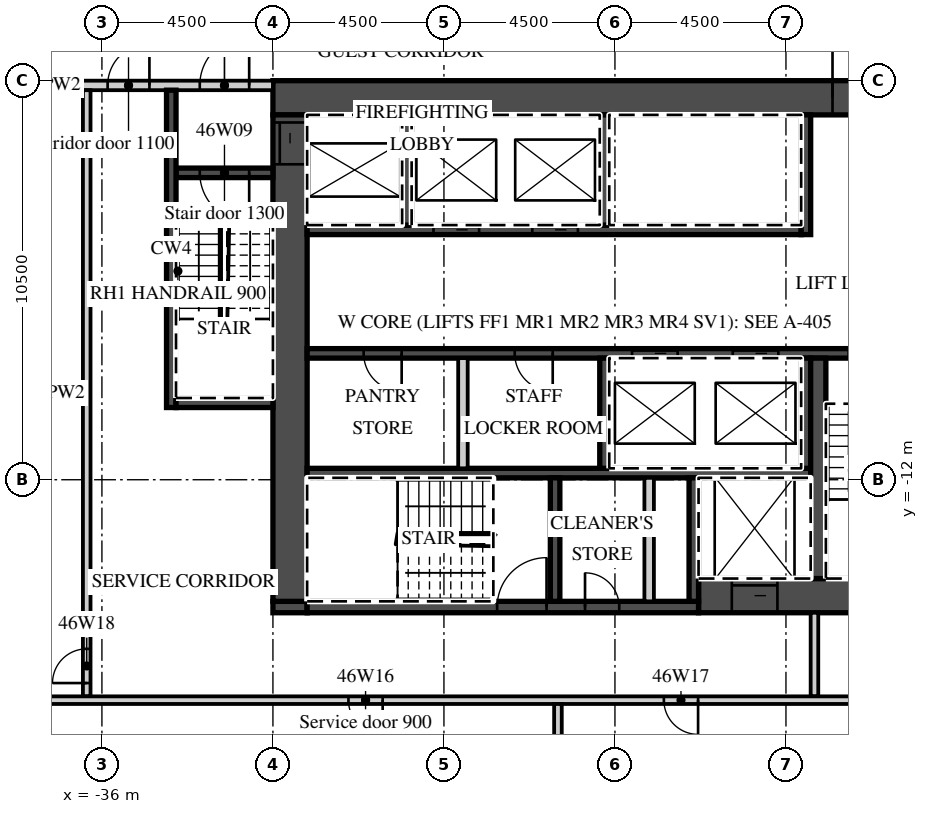
"""IFC4 building model, lengths in metres.
Left out: names, types, materials, properties, quantities, classifications, styles, units other than length and angle.
Written with IfcOpenShell. Run it as: python <this file> out.ifc"""

import sys

from ifc_helpers import new_model, si_unit, direction, frame, frame_2d, origin, place, context, subcontext, project, spatial, rectangle, extrude, element, fill, save


model = new_model("IFC4")
c1 = context("Model", 3, precision=1e-05, world=origin(), true_north=direction((0.0, 1.0)))
c2 = subcontext(c1, "Body", "Model", "MODEL_VIEW")
j1 = project(units=[si_unit("LENGTHUNIT", "METRE"), si_unit("PLANEANGLEUNIT", "RADIAN")], contexts=[c1])
p1 = place(None, origin())
s1 = spatial("IfcSite", under=j1, at=p1, CompositionType="ELEMENT")
p2 = place(p1, origin())
s2 = spatial("IfcBuilding", under=s1, at=p2, CompositionType="ELEMENT")
p3 = place(p2, frame((0.0, 0.0, 193.3)))
s3 = spatial("IfcBuildingStorey", under=s2, at=p3, CompositionType="ELEMENT", Elevation=193.3)
p4 = place(p3, frame((-31.5, -1.95, 0.0), z_axis=(0.0, 0.0, 1.0), x_axis=(1.0, 0.0, 0.0)))
e1 = element("IfcWall", 1, at=p4, inside=s3, PredefinedType="SHEAR", context=c2, shape_type="SweptSolid", body=[
    extrude(rectangle(XDim=18.0, YDim=0.9, at=frame_2d((9.0, 0.0))), origin(), (0.0, 0.0, 1.0), 3.02),
])
p5 = place(p4, frame((14.725, 0.0, 0.0)))
e2 = element("IfcOpeningElement", 2, at=p5, cuts=e1, PredefinedType="OPENING", context=c2, shape_type="SweptSolid", body=[
    extrude(rectangle(XDim=1.8, YDim=2.1, at=frame_2d((0.9, 1.05))), frame((0.0, 0.46, 0.0), z_axis=(0.0, -1.0, 0.0), x_axis=(1.0, 0.0, 0.0)), (0.0, 0.0, 1.0), 0.92),
])
p6 = place(p3, frame((-20.3, -15.05, 0.0), z_axis=(0.0, 0.0, 1.0), x_axis=(1.0, 0.0, 0.0)))
e3 = element("IfcWall", 3, at=p6, inside=s3, PredefinedType="SHEAR", context=c2, shape_type="SweptSolid", body=[
    extrude(rectangle(XDim=6.8, YDim=0.9, at=frame_2d((3.4, 0.0))), origin(), (0.0, 0.0, 1.0), 3.02),
])
p7 = place(p6, frame((0.875, 0.0, 0.0)))
e4 = element("IfcOpeningElement", 4, at=p7, cuts=e3, PredefinedType="OPENING", context=c2, shape_type="SweptSolid", body=[
    extrude(rectangle(XDim=1.2, YDim=2.1, at=frame_2d((0.6, 1.05))), frame((0.0, 0.46, 0.0), z_axis=(0.0, -1.0, 0.0), x_axis=(1.0, 0.0, 0.0)), (0.0, 0.0, 1.0), 0.92),
])
p8 = place(p3, frame((-31.5, -15.35, 0.0), z_axis=(0.0, 0.0, 1.0), x_axis=(1.0, 0.0, 0.0)))
e5 = element("IfcWall", 5, at=p8, inside=s3, PredefinedType="SHEAR", context=c2, shape_type="SweptSolid", body=[
    extrude(rectangle(XDim=0.9, YDim=0.3, at=frame_2d((0.45, 0.0))), origin(), (0.0, 0.0, 1.0), 3.02),
])
p9 = place(p3, frame((-30.6, -15.35, 0.0), z_axis=(0.0, 0.0, 1.0), x_axis=(1.0, 0.0, 0.0)))
e6 = element("IfcWall", 6, at=p9, inside=s3, PredefinedType="SHEAR", context=c2, shape_type="SweptSolid", body=[
    extrude(rectangle(XDim=10.3, YDim=0.3, at=frame_2d((5.15, 0.0))), origin(), (0.0, 0.0, 1.0), 3.02),
])
p10 = place(p9, frame((5.0, 0.0, 0.0)))
e7 = element("IfcOpeningElement", 7, at=p10, cuts=e6, PredefinedType="OPENING", context=c2, shape_type="SweptSolid", body=[
    extrude(rectangle(XDim=1.3, YDim=2.1, at=frame_2d((0.65, 1.05))), frame((0.0, 0.16, 0.0), z_axis=(0.0, -1.0, 0.0), x_axis=(1.0, 0.0, 0.0)), (0.0, 0.0, 1.0), 0.32),
])
p11 = place(p9, frame((7.312, 0.0, 0.0)))
e8 = element("IfcOpeningElement", 8, at=p11, cuts=e6, PredefinedType="OPENING", context=c2, shape_type="SweptSolid", body=[
    extrude(rectangle(XDim=0.9, YDim=2.1, at=frame_2d((0.45, 1.05))), frame((0.0, 0.16, 0.0), z_axis=(0.0, -1.0, 0.0), x_axis=(1.0, 0.0, 0.0)), (0.0, 0.0, 1.0), 0.32),
])
p12 = place(p3, frame((-31.05, -15.2, 0.0), z_axis=(0.0, 0.0, 1.0), x_axis=(0.0, 1.0, 0.0)))
e9 = element("IfcWall", 9, at=p12, inside=s3, PredefinedType="SHEAR", context=c2, shape_type="SweptSolid", body=[
    extrude(rectangle(XDim=12.8, YDim=0.9, at=frame_2d((6.4, 0.0))), origin(), (0.0, 0.0, 1.0), 3.02),
])
p13 = place(p12, frame((11.5, 0.0, 0.0)))
e10 = element("IfcOpeningElement", 10, at=p13, cuts=e9, PredefinedType="OPENING", context=c2, shape_type="SweptSolid", body=[
    extrude(rectangle(XDim=1.1, YDim=2.1, at=frame_2d((0.55, 1.05))), frame((0.0, 0.46, 0.0), z_axis=(0.0, -1.0, 0.0), x_axis=(1.0, 0.0, 0.0)), (0.0, 0.0, 1.0), 0.92),
])
p14 = place(p3, frame((-30.6, -5.425, 0.0), z_axis=(0.0, 0.0, 1.0), x_axis=(1.0, 0.0, 0.0)))
e11 = element("IfcWall", 11, at=p14, inside=s3, PredefinedType="SHEAR", context=c2, shape_type="SweptSolid", body=[
    extrude(rectangle(XDim=13.0, YDim=0.25, at=frame_2d((6.5, 0.0))), origin(), (0.0, 0.0, 1.0), 3.02),
])
p15 = place(p14, frame((3.325, 0.0, 0.0)))
e12 = element("IfcOpeningElement", 12, at=p15, cuts=e11, PredefinedType="OPENING", context=c2, shape_type="SweptSolid", body=[
    extrude(rectangle(XDim=1.2, YDim=2.1, at=frame_2d((0.6, 1.05))), frame((0.0, 0.135, 0.0), z_axis=(0.0, -1.0, 0.0), x_axis=(1.0, 0.0, 0.0)), (0.0, 0.0, 1.0), 0.27),
])
p16 = place(p14, frame((5.925, 0.0, 0.0)))
e13 = element("IfcOpeningElement", 13, at=p16, cuts=e11, PredefinedType="OPENING", context=c2, shape_type="SweptSolid", body=[
    extrude(rectangle(XDim=1.2, YDim=2.1, at=frame_2d((0.6, 1.05))), frame((0.0, 0.135, 0.0), z_axis=(0.0, -1.0, 0.0), x_axis=(1.0, 0.0, 0.0)), (0.0, 0.0, 1.0), 0.27),
])
p17 = place(p3, frame((-17.475, -5.55, 0.0), z_axis=(0.0, 0.0, 1.0), x_axis=(0.0, 1.0, 0.0)))
e14 = element("IfcWall", 14, at=p17, inside=s3, PredefinedType="SHEAR", context=c2, shape_type="SweptSolid", body=[
    extrude(rectangle(XDim=3.15, YDim=0.25, at=frame_2d((1.575, 0.0))), origin(), (0.0, 0.0, 1.0), 3.02),
])
for number, where, z_axis, x_axis in (
    (15, (-27.975, -5.3, 0.0), (0.0, 0.0, 1.0), (0.0, 1.0, 0.0)),
    (16, (-22.775, -5.3, 0.0), (0.0, 0.0, 1.0), (0.0, 1.0, 0.0)),
):
    element("IfcWall", number, at=place(p3, frame(where, z_axis=z_axis, x_axis=x_axis)), inside=s3, PredefinedType="SHEAR", context=c2, shape_type="SweptSolid", body=[
        extrude(rectangle(XDim=2.9, YDim=0.25, at=frame_2d((1.45, 0.0))), origin(), (0.0, 0.0, 1.0), 3.02),
    ])
p18 = place(p3, frame((-30.6, -8.675, 0.0), z_axis=(0.0, 0.0, 1.0), x_axis=(1.0, 0.0, 0.0)))
e17 = element("IfcWall", 17, at=p18, inside=s3, PredefinedType="SHEAR", context=c2, shape_type="SweptSolid", body=[
    extrude(rectangle(XDim=16.2, YDim=0.25, at=frame_2d((8.1, 0.0))), origin(), (0.0, 0.0, 1.0), 3.02),
])
p19 = place(p18, frame((8.55, 0.0, 0.0)))
e18 = element("IfcOpeningElement", 18, at=p19, cuts=e17, PredefinedType="OPENING", context=c2, shape_type="SweptSolid", body=[
    extrude(rectangle(XDim=1.2, YDim=2.1, at=frame_2d((0.6, 1.05))), frame((0.0, 0.135, 0.0), z_axis=(0.0, -1.0, 0.0), x_axis=(1.0, 0.0, 0.0)), (0.0, 0.0, 1.0), 0.27),
])
p20 = place(p18, frame((11.2, 0.0, 0.0)))
e19 = element("IfcOpeningElement", 19, at=p20, cuts=e17, PredefinedType="OPENING", context=c2, shape_type="SweptSolid", body=[
    extrude(rectangle(XDim=1.2, YDim=2.1, at=frame_2d((0.6, 1.05))), frame((0.0, 0.135, 0.0), z_axis=(0.0, -1.0, 0.0), x_axis=(1.0, 0.0, 0.0)), (0.0, 0.0, 1.0), 0.27),
])
p21 = place(p18, frame((14.25, 0.0, 0.0)))
e20 = element("IfcOpeningElement", 20, at=p21, cuts=e17, PredefinedType="OPENING", context=c2, shape_type="SweptSolid", body=[
    extrude(rectangle(XDim=1.3, YDim=2.1, at=frame_2d((0.65, 1.05))), frame((0.0, 0.135, 0.0), z_axis=(0.0, -1.0, 0.0), x_axis=(1.0, 0.0, 0.0)), (0.0, 0.0, 1.0), 0.27),
])
p22 = place(p18, frame((1.488, 0.0, 0.0)))
e21 = element("IfcOpeningElement", 21, at=p22, cuts=e17, PredefinedType="OPENING", context=c2, shape_type="SweptSolid", body=[
    extrude(rectangle(XDim=1.0, YDim=2.1, at=frame_2d((0.5, 1.05))), frame((0.0, 0.135, 0.0), z_axis=(0.0, -1.0, 0.0), x_axis=(1.0, 0.0, 0.0)), (0.0, 0.0, 1.0), 0.27),
])
p23 = place(p18, frame((5.462, 0.0, 0.0)))
e22 = element("IfcOpeningElement", 22, at=p23, cuts=e17, PredefinedType="OPENING", context=c2, shape_type="SweptSolid", body=[
    extrude(rectangle(XDim=1.0, YDim=2.1, at=frame_2d((0.5, 1.05))), frame((0.0, 0.135, 0.0), z_axis=(0.0, -1.0, 0.0), x_axis=(1.0, 0.0, 0.0)), (0.0, 0.0, 1.0), 0.27),
])
p24 = place(p3, frame((-30.6, -11.825, 0.0), z_axis=(0.0, 0.0, 1.0), x_axis=(1.0, 0.0, 0.0)))
e23 = element("IfcWall", 23, at=p24, inside=s3, PredefinedType="SHEAR", context=c2, shape_type="SweptSolid", body=[
    extrude(rectangle(XDim=13.25, YDim=0.25, at=frame_2d((6.625, 0.0))), origin(), (0.0, 0.0, 1.0), 3.02),
])
for number, where, z_axis, x_axis in (
    (24, (-17.475, -11.7, 0.0), (0.0, 0.0, 1.0), (0.0, 1.0, 0.0)),
    (25, (-22.775, -11.7, 0.0), (0.0, 0.0, 1.0), (0.0, 1.0, 0.0)),
):
    element("IfcWall", number, at=place(p3, frame(where, z_axis=z_axis, x_axis=x_axis)), inside=s3, PredefinedType="SHEAR", context=c2, shape_type="SweptSolid", body=[
        extrude(rectangle(XDim=2.9, YDim=0.25, at=frame_2d((1.45, 0.0))), origin(), (0.0, 0.0, 1.0), 3.02),
    ])
p25 = place(p3, frame((-26.5, -11.7, 0.0), z_axis=(0.0, 0.0, 1.0), x_axis=(0.0, 1.0, 0.0)))
e26 = element("IfcWall", 26, at=p25, inside=s3, PredefinedType="PARTITIONING", context=c2, shape_type="SweptSolid", body=[
    extrude(rectangle(XDim=2.9, YDim=0.25, at=frame_2d((1.45, 0.0))), origin(), (0.0, 0.0, 1.0), 3.02),
])
p26 = place(p3, frame((-17.15, -14.6, 0.0), z_axis=(0.0, 0.0, 1.0), x_axis=(0.0, 1.0, 0.0)))
e27 = element("IfcWall", 27, at=p26, inside=s3, PredefinedType="SHEAR", context=c2, shape_type="SweptSolid", body=[
    extrude(rectangle(XDim=5.8, YDim=0.4, at=frame_2d((2.9, 0.0))), origin(), (0.0, 0.0, 1.0), 3.02),
])
for number, where, z_axis, x_axis in (
    (28, (-20.425, -15.2, 0.0), (0.0, 0.0, 1.0), (0.0, 1.0, 0.0)),
    (29, (-24.075, -15.2, 0.0), (0.0, 0.0, 1.0), (0.0, 1.0, 0.0)),
):
    element("IfcWall", number, at=place(p3, frame(where, z_axis=z_axis, x_axis=x_axis)), inside=s3, PredefinedType="SHEAR", context=c2, shape_type="SweptSolid", body=[
        extrude(rectangle(XDim=3.25, YDim=0.25, at=frame_2d((1.625, 0.0))), origin(), (0.0, 0.0, 1.0), 3.02),
    ])
p27 = place(p3, frame((-21.6, -15.2, 0.0), z_axis=(0.0, 0.0, 1.0), x_axis=(0.0, 1.0, 0.0)))
e30 = element("IfcWall", 30, at=p27, inside=s3, PredefinedType="PARTITIONING", context=c2, shape_type="SweptSolid", body=[
    extrude(rectangle(XDim=3.25, YDim=0.25, at=frame_2d((1.625, 0.0))), origin(), (0.0, 0.0, 1.0), 3.02),
])
p28 = place(p3, frame((-42.632, -1.625, 0.0), z_axis=(0.0, 0.0, 1.0), x_axis=(1.0, 0.0, 0.0)))
e31 = element("IfcWall", 31, at=p28, inside=s3, PredefinedType="PARTITIONING", context=c2, shape_type="SweptSolid", body=[
    extrude(rectangle(XDim=11.132, YDim=0.25, at=frame_2d((5.566, 0.0))), origin(), (0.0, 0.0, 1.0), 3.02),
])
p29 = place(p28, frame((9.207, 0.0, 0.0)))
e32 = element("IfcOpeningElement", 32, at=p29, cuts=e31, PredefinedType="OPENING", context=c2, shape_type="SweptSolid", body=[
    extrude(rectangle(XDim=1.3, YDim=2.1, at=frame_2d((0.65, 1.05))), frame((0.0, 0.135, 0.0), z_axis=(0.0, -1.0, 0.0), x_axis=(1.0, 0.0, 0.0)), (0.0, 0.0, 1.0), 0.27),
])
p30 = place(p28, frame((6.781, 0.0, 0.0)))
e33 = element("IfcOpeningElement", 33, at=p30, cuts=e31, PredefinedType="OPENING", context=c2, shape_type="SweptSolid", body=[
    extrude(rectangle(XDim=1.1, YDim=2.1, at=frame_2d((0.55, 1.05))), frame((0.0, 0.135, 0.0), z_axis=(0.0, -1.0, 0.0), x_axis=(1.0, 0.0, 0.0)), (0.0, 0.0, 1.0), 0.27),
])
p31 = place(p3, frame((-34.05, -3.925, 0.0), z_axis=(0.0, 0.0, 1.0), x_axis=(1.0, 0.0, 0.0)))
e34 = element("IfcWall", 34, at=p31, inside=s3, PredefinedType="SHEAR", context=c2, shape_type="SweptSolid", body=[
    extrude(rectangle(XDim=2.55, YDim=0.25, at=frame_2d((1.275, 0.0))), origin(), (0.0, 0.0, 1.0), 3.02),
])
p32 = place(p31, frame((0.625, 0.0, 0.0)))
e35 = element("IfcOpeningElement", 35, at=p32, cuts=e34, PredefinedType="OPENING", context=c2, shape_type="SweptSolid", body=[
    extrude(rectangle(XDim=1.3, YDim=2.1, at=frame_2d((0.65, 1.05))), frame((0.0, 0.135, 0.0), z_axis=(0.0, -1.0, 0.0), x_axis=(1.0, 0.0, 0.0)), (0.0, 0.0, 1.0), 0.27),
])
p33 = place(p3, frame((-34.175, -10.1, 0.0), z_axis=(0.0, 0.0, 1.0), x_axis=(0.0, 1.0, 0.0)))
e36 = element("IfcWall", 36, at=p33, inside=s3, PredefinedType="SHEAR", context=c2, shape_type="SweptSolid", body=[
    extrude(rectangle(XDim=8.35, YDim=0.25, at=frame_2d((4.175, 0.0))), origin(), (0.0, 0.0, 1.0), 3.02),
])
p34 = place(p3, frame((-34.05, -9.975, 0.0), z_axis=(0.0, 0.0, 1.0), x_axis=(1.0, 0.0, 0.0)))
e37 = element("IfcWall", 37, at=p34, inside=s3, PredefinedType="SHEAR", context=c2, shape_type="SweptSolid", body=[
    extrude(rectangle(XDim=2.55, YDim=0.25, at=frame_2d((1.275, 0.0))), origin(), (0.0, 0.0, 1.0), 3.02),
])
p35 = place(p3, frame((-17.25, -17.7, 0.0), z_axis=(0.0, 0.0, 1.0), x_axis=(0.0, 1.0, 0.0)))
e38 = element("IfcWall", 38, at=p35, inside=s3, PredefinedType="PARTITIONING", context=c2, shape_type="SweptSolid", body=[
    extrude(rectangle(XDim=2.2, YDim=0.2, at=frame_2d((1.1, 0.0))), origin(), (0.0, 0.0, 1.0), 3.02),
])
p36 = place(p3, frame((-36.4, -17.7, 0.0), z_axis=(0.0, 0.0, 1.0), x_axis=(0.0, 1.0, 0.0)))
e39 = element("IfcWall", 39, at=p36, inside=s3, PredefinedType="PARTITIONING", context=c2, shape_type="SweptSolid", body=[
    extrude(rectangle(XDim=15.95, YDim=0.2, at=frame_2d((7.975, 0.0))), origin(), (0.0, 0.0, 1.0), 3.02),
])
p37 = place(p36, frame((0.35, 0.0, 0.0)))
e40 = element("IfcOpeningElement", 40, at=p37, cuts=e39, PredefinedType="OPENING", context=c2, shape_type="SweptSolid", body=[
    extrude(rectangle(XDim=0.9, YDim=2.1, at=frame_2d((0.45, 1.05))), frame((0.0, 0.11, 0.0), z_axis=(0.0, -1.0, 0.0), x_axis=(1.0, 0.0, 0.0)), (0.0, 0.0, 1.0), 0.22),
])
p38 = place(p3, frame((-41.074, -17.8, 0.0), z_axis=(0.0, 0.0, 1.0), x_axis=(1.0, 0.0, 0.0)))
e41 = element("IfcWall", 41, at=p38, inside=s3, PredefinedType="PARTITIONING", context=c2, shape_type="SweptSolid", body=[
    extrude(rectangle(XDim=27.474, YDim=0.2, at=frame_2d((13.737, 0.0))), origin(), (0.0, 0.0, 1.0), 3.02),
])
p39 = place(p38, frame((11.562, 0.0, 0.0)))
e42 = element("IfcOpeningElement", 42, at=p39, cuts=e41, PredefinedType="OPENING", context=c2, shape_type="SweptSolid", body=[
    extrude(rectangle(XDim=0.9, YDim=2.1, at=frame_2d((0.45, 1.05))), frame((0.0, 0.11, 0.0), z_axis=(0.0, -1.0, 0.0), x_axis=(1.0, 0.0, 0.0)), (0.0, 0.0, 1.0), 0.22),
])
p40 = place(p38, frame((19.862, 0.0, 0.0)))
e43 = element("IfcOpeningElement", 43, at=p40, cuts=e41, PredefinedType="OPENING", context=c2, shape_type="SweptSolid", body=[
    extrude(rectangle(XDim=0.9, YDim=2.1, at=frame_2d((0.45, 1.05))), frame((0.0, 0.11, 0.0), z_axis=(0.0, -1.0, 0.0), x_axis=(1.0, 0.0, 0.0)), (0.0, 0.0, 1.0), 0.22),
])
p41 = place(p3, frame((-24.0, -23.312, 0.0), z_axis=(0.0, 0.0, 1.0), x_axis=(0.0, 1.0, 0.0)))
e44 = element("IfcWall", 44, at=p41, inside=s3, PredefinedType="PARTITIONING", context=c2, shape_type="SweptSolid", body=[
    extrude(rectangle(XDim=5.413, YDim=0.2, at=frame_2d((2.706, 0.0))), origin(), (0.0, 0.0, 1.0), 3.02),
])
p42 = place(p19, origin())
e45 = element("IfcDoor", 45, at=p42, inside=s3, OperationType="SLIDING_TO_LEFT", PredefinedType="DOOR", context=c2, shape_type="SweptSolid", body=[
    extrude(rectangle(XDim=1.2, YDim=2.1, at=frame_2d((0.6, 1.05))), frame((0.0, 0.025, 0.0), z_axis=(0.0, -1.0, 0.0), x_axis=(1.0, 0.0, 0.0)), (0.0, 0.0, 1.0), 0.05),
])
fill(e18, e45)
p43 = place(p20, origin())
e46 = element("IfcDoor", 46, at=p43, inside=s3, OperationType="SLIDING_TO_RIGHT", PredefinedType="DOOR", context=c2, shape_type="SweptSolid", body=[
    extrude(rectangle(XDim=1.2, YDim=2.1, at=frame_2d((0.6, 1.05))), frame((0.0, 0.025, 0.0), z_axis=(0.0, -1.0, 0.0), x_axis=(1.0, 0.0, 0.0)), (0.0, 0.0, 1.0), 0.05),
])
fill(e19, e46)
p44 = place(p15, origin())
e47 = element("IfcDoor", 47, at=p44, inside=s3, OperationType="SLIDING_TO_RIGHT", PredefinedType="DOOR", context=c2, shape_type="SweptSolid", body=[
    extrude(rectangle(XDim=1.2, YDim=2.1, at=frame_2d((0.6, 1.05))), frame((0.0, 0.025, 0.0), z_axis=(0.0, -1.0, 0.0), x_axis=(1.0, 0.0, 0.0)), (0.0, 0.0, 1.0), 0.05),
])
fill(e12, e47)
p45 = place(p16, origin())
e48 = element("IfcDoor", 48, at=p45, inside=s3, OperationType="SLIDING_TO_RIGHT", PredefinedType="DOOR", context=c2, shape_type="SweptSolid", body=[
    extrude(rectangle(XDim=1.2, YDim=2.1, at=frame_2d((0.6, 1.05))), frame((0.0, 0.025, 0.0), z_axis=(0.0, -1.0, 0.0), x_axis=(1.0, 0.0, 0.0)), (0.0, 0.0, 1.0), 0.05),
])
fill(e13, e48)
p46 = place(p7, origin())
e49 = element("IfcDoor", 49, at=p46, inside=s3, OperationType="SLIDING_TO_LEFT", PredefinedType="DOOR", context=c2, shape_type="SweptSolid", body=[
    extrude(rectangle(XDim=1.2, YDim=2.1, at=frame_2d((0.6, 1.05))), frame((0.0, 0.025, 0.0), z_axis=(0.0, -1.0, 0.0), x_axis=(1.0, 0.0, 0.0)), (0.0, 0.0, 1.0), 0.05),
])
fill(e4, e49)
p47 = place(p13, origin())
e50 = element("IfcDoor", 50, at=p47, inside=s3, OperationType="SLIDING_TO_RIGHT", PredefinedType="DOOR", context=c2, shape_type="SweptSolid", body=[
    extrude(rectangle(XDim=1.1, YDim=2.1, at=frame_2d((0.55, 1.05))), frame((0.0, 0.025, 0.0), z_axis=(0.0, -1.0, 0.0), x_axis=(1.0, 0.0, 0.0)), (0.0, 0.0, 1.0), 0.05),
])
fill(e10, e50)
p48 = place(p5, origin())
e51 = element("IfcDoor", 51, at=p48, inside=s3, OperationType="DOUBLE_DOOR_DOUBLE_SWING", PredefinedType="DOOR", context=c2, shape_type="SweptSolid", body=[
    extrude(rectangle(XDim=1.8, YDim=2.1, at=frame_2d((0.9, 1.05))), frame((0.0, 0.025, 0.0), z_axis=(0.0, -1.0, 0.0), x_axis=(1.0, 0.0, 0.0)), (0.0, 0.0, 1.0), 0.05),
])
fill(e2, e51)
p49 = place(p29, origin())
e52 = element("IfcDoor", 52, at=p49, inside=s3, OperationType="SINGLE_SWING_RIGHT", PredefinedType="DOOR", context=c2, shape_type="SweptSolid", body=[
    extrude(rectangle(XDim=1.3, YDim=2.1, at=frame_2d((0.65, 1.05))), frame((0.0, 0.025, 0.0), z_axis=(0.0, -1.0, 0.0), x_axis=(1.0, 0.0, 0.0)), (0.0, 0.0, 1.0), 0.05),
])
fill(e32, e52)
p50 = place(p32, origin())
e53 = element("IfcDoor", 53, at=p50, inside=s3, OperationType="SINGLE_SWING_RIGHT", PredefinedType="DOOR", context=c2, shape_type="SweptSolid", body=[
    extrude(rectangle(XDim=1.3, YDim=2.1, at=frame_2d((0.65, 1.05))), frame((0.0, 0.025, 0.0), z_axis=(0.0, -1.0, 0.0), x_axis=(1.0, 0.0, 0.0)), (0.0, 0.0, 1.0), 0.05),
])
fill(e35, e53)
p51 = place(p30, origin())
e54 = element("IfcDoor", 54, at=p51, inside=s3, OperationType="SINGLE_SWING_RIGHT", PredefinedType="DOOR", context=c2, shape_type="SweptSolid", body=[
    extrude(rectangle(XDim=1.1, YDim=2.1, at=frame_2d((0.55, 1.05))), frame((0.0, 0.025, 0.0), z_axis=(0.0, -1.0, 0.0), x_axis=(1.0, 0.0, 0.0)), (0.0, 0.0, 1.0), 0.05),
])
fill(e33, e54)
p52 = place(p21, origin())
e55 = element("IfcDoor", 55, at=p52, inside=s3, OperationType="SINGLE_SWING_RIGHT", PredefinedType="DOOR", context=c2, shape_type="SweptSolid", body=[
    extrude(rectangle(XDim=1.3, YDim=2.1, at=frame_2d((0.65, 1.05))), frame((0.0, 0.025, 0.0), z_axis=(0.0, -1.0, 0.0), x_axis=(1.0, 0.0, 0.0)), (0.0, 0.0, 1.0), 0.05),
])
fill(e20, e55)
p53 = place(p10, origin())
e56 = element("IfcDoor", 56, at=p53, inside=s3, OperationType="SINGLE_SWING_RIGHT", PredefinedType="DOOR", context=c2, shape_type="SweptSolid", body=[
    extrude(rectangle(XDim=1.3, YDim=2.1, at=frame_2d((0.65, 1.05))), frame((0.0, 0.025, 0.0), z_axis=(0.0, -1.0, 0.0), x_axis=(1.0, 0.0, 0.0)), (0.0, 0.0, 1.0), 0.05),
])
fill(e7, e56)
p54 = place(p11, origin())
e57 = element("IfcDoor", 57, at=p54, inside=s3, OperationType="SINGLE_SWING_LEFT", PredefinedType="DOOR", context=c2, shape_type="SweptSolid", body=[
    extrude(rectangle(XDim=0.9, YDim=2.1, at=frame_2d((0.45, 1.05))), frame((0.0, 0.025, 0.0), z_axis=(0.0, -1.0, 0.0), x_axis=(1.0, 0.0, 0.0)), (0.0, 0.0, 1.0), 0.05),
])
fill(e8, e57)
p55 = place(p22, origin())
e58 = element("IfcDoor", 58, at=p55, inside=s3, OperationType="SINGLE_SWING_RIGHT", PredefinedType="DOOR", context=c2, shape_type="SweptSolid", body=[
    extrude(rectangle(XDim=1.0, YDim=2.1, at=frame_2d((0.5, 1.05))), frame((0.0, 0.025, 0.0), z_axis=(0.0, -1.0, 0.0), x_axis=(1.0, 0.0, 0.0)), (0.0, 0.0, 1.0), 0.05),
])
fill(e21, e58)
p56 = place(p23, origin())
e59 = element("IfcDoor", 59, at=p56, inside=s3, OperationType="SINGLE_SWING_RIGHT", PredefinedType="DOOR", context=c2, shape_type="SweptSolid", body=[
    extrude(rectangle(XDim=1.0, YDim=2.1, at=frame_2d((0.5, 1.05))), frame((0.0, 0.025, 0.0), z_axis=(0.0, -1.0, 0.0), x_axis=(1.0, 0.0, 0.0)), (0.0, 0.0, 1.0), 0.05),
])
fill(e22, e59)
p57 = place(p39, origin())
e60 = element("IfcDoor", 60, at=p57, inside=s3, OperationType="SINGLE_SWING_RIGHT", PredefinedType="DOOR", context=c2, shape_type="SweptSolid", body=[
    extrude(rectangle(XDim=0.9, YDim=2.1, at=frame_2d((0.45, 1.05))), frame((0.0, 0.025, 0.0), z_axis=(0.0, -1.0, 0.0), x_axis=(1.0, 0.0, 0.0)), (0.0, 0.0, 1.0), 0.05),
])
fill(e42, e60)
p58 = place(p40, origin())
e61 = element("IfcDoor", 61, at=p58, inside=s3, OperationType="SINGLE_SWING_RIGHT", PredefinedType="DOOR", context=c2, shape_type="SweptSolid", body=[
    extrude(rectangle(XDim=0.9, YDim=2.1, at=frame_2d((0.45, 1.05))), frame((0.0, 0.025, 0.0), z_axis=(0.0, -1.0, 0.0), x_axis=(1.0, 0.0, 0.0)), (0.0, 0.0, 1.0), 0.05),
])
fill(e43, e61)
p59 = place(p37, origin())
e62 = element("IfcDoor", 62, at=p59, inside=s3, OperationType="SINGLE_SWING_LEFT", PredefinedType="DOOR", context=c2, shape_type="SweptSolid", body=[
    extrude(rectangle(XDim=0.9, YDim=2.1, at=frame_2d((0.45, 1.05))), frame((0.0, 0.025, 0.0), z_axis=(0.0, -1.0, 0.0), x_axis=(1.0, 0.0, 0.0)), (0.0, 0.0, 1.0), 0.05),
])
fill(e40, e62)
save(model, sys.argv[1])
